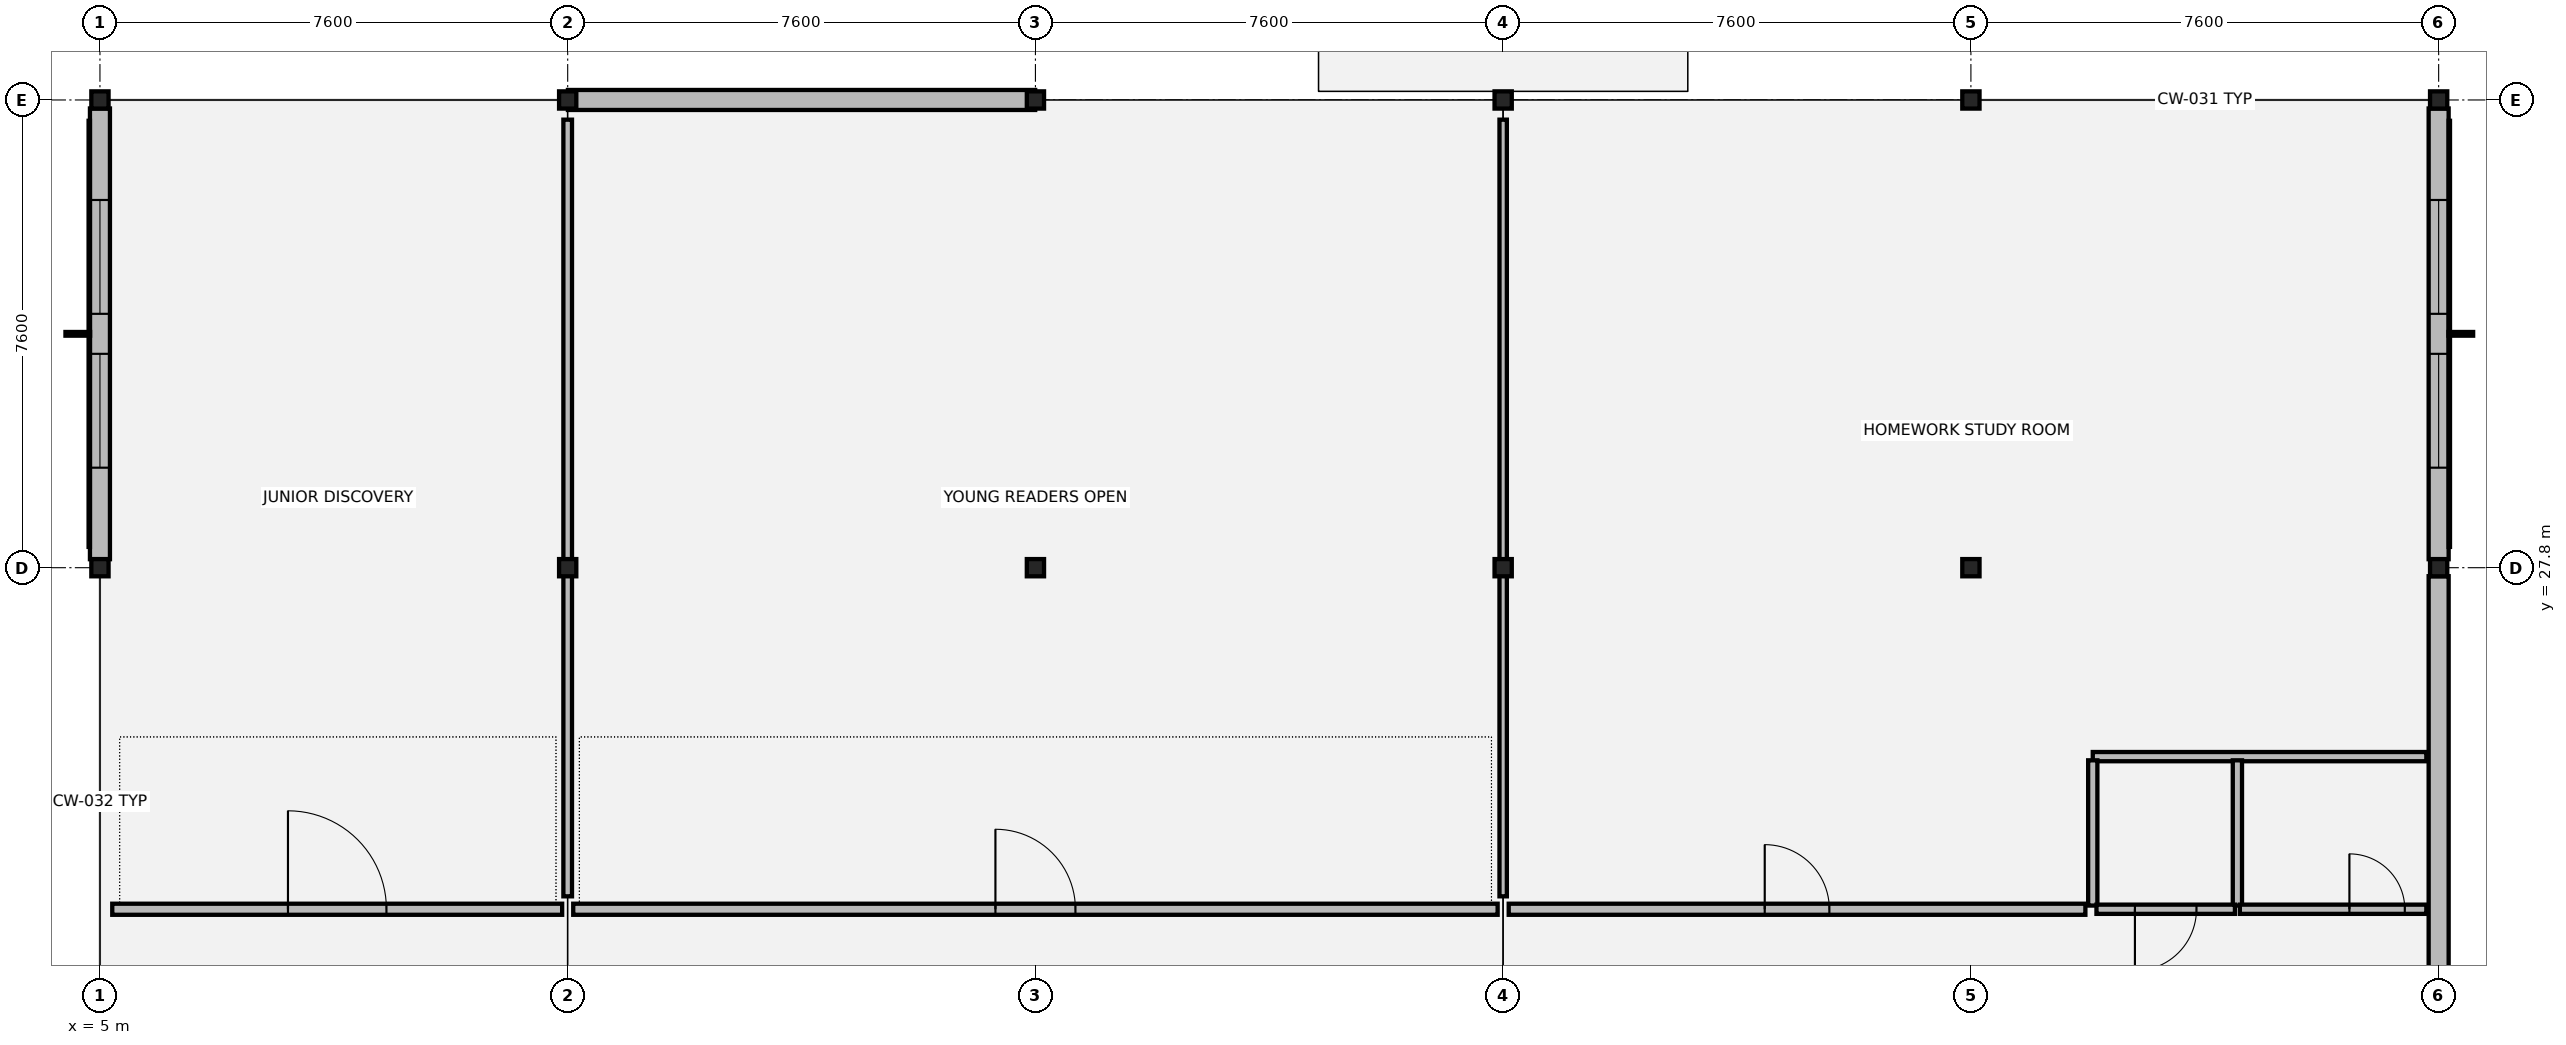
"""IFC4 building model, lengths in metres.
Left out: names, types, materials, properties, quantities, classifications, styles, units other than length and angle.
Written with IfcOpenShell. Run it as: python <this file> out.ifc"""

import sys

from ifc_helpers import new_model, si_unit, direction, frame, frame_2d, origin, origin_2d, place, context, subcontext, project, spatial, rectangle, i_section, extrude, element, fill, save


model = new_model("IFC4")
c1 = context("Model", 3, precision=1e-05, world=origin(), true_north=direction((0.0, 1.0)))
c2 = subcontext(c1, "Body", "Model", "MODEL_VIEW")
j1 = project(units=[si_unit("LENGTHUNIT", "METRE"), si_unit("PLANEANGLEUNIT", "RADIAN")], contexts=[c1])
p1 = place(None, origin())
s1 = spatial("IfcSite", under=j1, at=p1, CompositionType="ELEMENT")
p2 = place(p1, origin())
s2 = spatial("IfcBuilding", under=s1, at=p2, CompositionType="ELEMENT")
p3 = place(p2, frame((0.0, 0.0, 5.1)))
s3 = spatial("IfcBuildingStorey", under=s2, at=p3, CompositionType="ELEMENT", Elevation=5.1)
for number, where, z_axis, x_axis in (
    (1, (5.0, 27.8, 0.0), (0.0, 0.0, 1.0), (1.0, 0.0, 0.0)),
    (2, (5.0, 35.4, 0.0), (0.0, 0.0, 1.0), (1.0, 0.0, 0.0)),
    (3, (12.6, 27.8, 0.0), (0.0, 0.0, 1.0), (1.0, 0.0, 0.0)),
    (4, (12.6, 35.4, 0.0), (0.0, 0.0, 1.0), (1.0, 0.0, 0.0)),
    (5, (20.2, 27.8, 0.0), (0.0, 0.0, 1.0), (1.0, 0.0, 0.0)),
    (6, (20.2, 35.4, 0.0), (0.0, 0.0, 1.0), (1.0, 0.0, 0.0)),
    (7, (27.8, 27.8, 0.0), (0.0, 0.0, 1.0), (1.0, 0.0, 0.0)),
    (8, (27.8, 35.4, 0.0), (0.0, 0.0, 1.0), (1.0, 0.0, 0.0)),
    (9, (35.4, 27.8, 0.0), (0.0, 0.0, 1.0), (1.0, 0.0, 0.0)),
    (10, (35.4, 35.4, 0.0), (0.0, 0.0, 1.0), (1.0, 0.0, 0.0)),
    (11, (43.0, 27.8, 0.0), (0.0, 0.0, 1.0), (1.0, 0.0, 0.0)),
    (12, (43.0, 35.4, 0.0), (0.0, 0.0, 1.0), (1.0, 0.0, 0.0)),
):
    element("IfcColumn", number, at=place(p3, frame(where, z_axis=z_axis, x_axis=x_axis)), inside=s3, PredefinedType="COLUMN", context=c2, shape_type="SweptSolid", body=[
        extrude(i_section(OverallWidth=0.28, OverallDepth=0.28, WebThickness=0.01, FlangeThickness=0.018, at=origin_2d()), origin(), (0.0, 0.0, 1.0), 4.055),
    ])
p4 = place(p3, frame((43.0, 20.338, 0.0), z_axis=(0.0, 0.0, 1.0), x_axis=(0.0, 1.0, 0.0)))
e13 = element("IfcWall", 13, at=p4, inside=s3, PredefinedType="SOLIDWALL", context=c2, shape_type="SweptSolid", body=[
    extrude(rectangle(XDim=7.324, YDim=0.325, at=frame_2d((3.662, 0.0))), origin(), (0.0, 0.0, 1.0), 3.48),
])
p5 = place(p3, frame((43.0, 27.938, 0.0), z_axis=(0.0, 0.0, 1.0), x_axis=(0.0, 1.0, 0.0)))
e14 = element("IfcWall", 14, at=p5, inside=s3, PredefinedType="SOLIDWALL", context=c2, shape_type="SweptSolid", body=[
    extrude(rectangle(XDim=7.324, YDim=0.325, at=frame_2d((3.662, 0.0))), origin(), (0.0, 0.0, 1.0), 3.48),
])
p6 = place(p5, frame((1.487, 0.0, 0.8)))
e15 = element("IfcOpeningElement", 15, at=p6, cuts=e14, PredefinedType="OPENING", context=c2, shape_type="SweptSolid", body=[
    extrude(rectangle(XDim=1.85, YDim=2.1, at=frame_2d((0.925, 1.05))), frame((0.0, 0.172, 0.0), z_axis=(0.0, -1.0, 0.0), x_axis=(1.0, 0.0, 0.0)), (0.0, 0.0, 1.0), 0.345),
])
p7 = place(p5, frame((3.987, 0.0, 0.8)))
e16 = element("IfcOpeningElement", 16, at=p7, cuts=e14, PredefinedType="OPENING", context=c2, shape_type="SweptSolid", body=[
    extrude(rectangle(XDim=1.85, YDim=2.1, at=frame_2d((0.925, 1.05))), frame((0.0, 0.172, 0.0), z_axis=(0.0, -1.0, 0.0), x_axis=(1.0, 0.0, 0.0)), (0.0, 0.0, 1.0), 0.345),
])
p8 = place(p3, frame((20.196, 35.4, 0.0), z_axis=(0.0, 0.0, 1.0), x_axis=(-1.0, 0.0, 0.0)))
e17 = element("IfcWall", 17, at=p8, inside=s3, PredefinedType="SOLIDWALL", context=c2, shape_type="SweptSolid", body=[
    extrude(rectangle(XDim=7.592, YDim=0.325, at=frame_2d((3.796, 0.0))), origin(), (0.0, 0.0, 1.0), 3.48),
])
p9 = place(p3, frame((5.0, 35.262, 0.0), z_axis=(0.0, 0.0, 1.0), x_axis=(0.0, -1.0, 0.0)))
e18 = element("IfcWall", 18, at=p9, inside=s3, PredefinedType="SOLIDWALL", context=c2, shape_type="SweptSolid", body=[
    extrude(rectangle(XDim=7.324, YDim=0.325, at=frame_2d((3.662, 0.0))), origin(), (0.0, 0.0, 1.0), 3.48),
])
p10 = place(p9, frame((1.487, 0.0, 0.8)))
e19 = element("IfcOpeningElement", 19, at=p10, cuts=e18, PredefinedType="OPENING", context=c2, shape_type="SweptSolid", body=[
    extrude(rectangle(XDim=1.85, YDim=2.1, at=frame_2d((0.925, 1.05))), frame((0.0, 0.172, 0.0), z_axis=(0.0, -1.0, 0.0), x_axis=(1.0, 0.0, 0.0)), (0.0, 0.0, 1.0), 0.345),
])
p11 = place(p9, frame((3.987, 0.0, 0.8)))
e20 = element("IfcOpeningElement", 20, at=p11, cuts=e18, PredefinedType="OPENING", context=c2, shape_type="SweptSolid", body=[
    extrude(rectangle(XDim=1.85, YDim=2.1, at=frame_2d((0.925, 1.05))), frame((0.0, 0.172, 0.0), z_axis=(0.0, -1.0, 0.0), x_axis=(1.0, 0.0, 0.0)), (0.0, 0.0, 1.0), 0.345),
])
p12 = place(p3, frame((37.38, 24.73, 0.0), z_axis=(0.0, 0.0, 1.0), x_axis=(1.0, 0.0, 0.0)))
e21 = element("IfcWall", 21, at=p12, inside=s3, PredefinedType="PARTITIONING", context=c2, shape_type="SweptSolid", body=[
    extrude(rectangle(XDim=5.42, YDim=0.15, at=frame_2d((2.71, 0.0))), origin(), (0.0, 0.0, 1.0), 3.18),
])
for number, where, z_axis, x_axis in (
    (22, (37.38, 22.31, 0.0), (0.0, 0.0, 1.0), (0.0, 1.0, 0.0)),
    (23, (39.73, 22.31, 0.0), (0.0, 0.0, 1.0), (0.0, 1.0, 0.0)),
):
    element("IfcWall", number, at=place(p3, frame(where, z_axis=z_axis, x_axis=x_axis)), inside=s3, PredefinedType="PARTITIONING", context=c2, shape_type="SweptSolid", body=[
        extrude(rectangle(XDim=2.36, YDim=0.15, at=frame_2d((1.18, 0.0))), origin(), (0.0, 0.0, 1.0), 3.18),
    ])
p13 = place(p3, frame((37.44, 22.25, 0.0), z_axis=(0.0, 0.0, 1.0), x_axis=(1.0, 0.0, 0.0)))
e24 = element("IfcWall", 24, at=p13, inside=s3, PredefinedType="PARTITIONING", context=c2, shape_type="SweptSolid", body=[
    extrude(rectangle(XDim=2.25, YDim=0.15, at=frame_2d((1.125, 0.0))), origin(), (0.0, 0.0, 1.0), 3.18),
])
p14 = place(p13, frame((0.625, 0.0, 0.0)))
e25 = element("IfcOpeningElement", 25, at=p14, cuts=e24, PredefinedType="OPENING", context=c2, shape_type="SweptSolid", body=[
    extrude(rectangle(XDim=1.0, YDim=2.15, at=frame_2d((0.5, 1.075))), frame((0.0, 0.085, 0.0), z_axis=(0.0, -1.0, 0.0), x_axis=(1.0, 0.0, 0.0)), (0.0, 0.0, 1.0), 0.17),
])
p15 = place(p3, frame((39.77, 22.25, 0.0), z_axis=(0.0, 0.0, 1.0), x_axis=(1.0, 0.0, 0.0)))
e26 = element("IfcWall", 26, at=p15, inside=s3, PredefinedType="PARTITIONING", context=c2, shape_type="SweptSolid", body=[
    extrude(rectangle(XDim=3.03, YDim=0.15, at=frame_2d((1.515, 0.0))), origin(), (0.0, 0.0, 1.0), 3.18),
])
p16 = place(p15, frame((1.78, 0.0, 0.0)))
e27 = element("IfcOpeningElement", 27, at=p16, cuts=e26, PredefinedType="OPENING", context=c2, shape_type="SweptSolid", body=[
    extrude(rectangle(XDim=0.9, YDim=2.15, at=frame_2d((0.45, 1.075))), frame((0.0, 0.085, 0.0), z_axis=(0.0, -1.0, 0.0), x_axis=(1.0, 0.0, 0.0)), (0.0, 0.0, 1.0), 0.17),
])
p17 = place(p3, frame((5.2, 22.25, 0.0), z_axis=(0.0, 0.0, 1.0), x_axis=(1.0, 0.0, 0.0)))
e28 = element("IfcWall", 28, at=p17, inside=s3, PredefinedType="PARTITIONING", context=c2, shape_type="SweptSolid", body=[
    extrude(rectangle(XDim=7.31, YDim=0.18, at=frame_2d((3.655, 0.0))), origin(), (0.0, 0.0, 1.0), 3.18),
])
p18 = place(p17, frame((2.855, 0.0, 0.0)))
e29 = element("IfcOpeningElement", 29, at=p18, cuts=e28, PredefinedType="OPENING", context=c2, shape_type="SweptSolid", body=[
    extrude(rectangle(XDim=1.6, YDim=2.25, at=frame_2d((0.8, 1.125))), frame((0.0, 0.1, 0.0), z_axis=(0.0, -1.0, 0.0), x_axis=(1.0, 0.0, 0.0)), (0.0, 0.0, 1.0), 0.2),
])
p19 = place(p3, frame((12.69, 22.25, 0.0), z_axis=(0.0, 0.0, 1.0), x_axis=(1.0, 0.0, 0.0)))
e30 = element("IfcWall", 30, at=p19, inside=s3, PredefinedType="PARTITIONING", context=c2, shape_type="SweptSolid", body=[
    extrude(rectangle(XDim=15.02, YDim=0.18, at=frame_2d((7.51, 0.0))), origin(), (0.0, 0.0, 1.0), 3.18),
])
p20 = place(p19, frame((6.86, 0.0, 0.0)))
e31 = element("IfcOpeningElement", 31, at=p20, cuts=e30, PredefinedType="OPENING", context=c2, shape_type="SweptSolid", body=[
    extrude(rectangle(XDim=1.3, YDim=2.2, at=frame_2d((0.65, 1.1))), frame((0.0, 0.1, 0.0), z_axis=(0.0, -1.0, 0.0), x_axis=(1.0, 0.0, 0.0)), (0.0, 0.0, 1.0), 0.2),
])
p21 = place(p3, frame((27.89, 22.25, 0.0), z_axis=(0.0, 0.0, 1.0), x_axis=(1.0, 0.0, 0.0)))
e32 = element("IfcWall", 32, at=p21, inside=s3, PredefinedType="PARTITIONING", context=c2, shape_type="SweptSolid", body=[
    extrude(rectangle(XDim=9.37, YDim=0.18, at=frame_2d((4.685, 0.0))), origin(), (0.0, 0.0, 1.0), 3.18),
])
p22 = place(p21, frame((4.16, 0.0, 0.0)))
e33 = element("IfcOpeningElement", 33, at=p22, cuts=e32, PredefinedType="OPENING", context=c2, shape_type="SweptSolid", body=[
    extrude(rectangle(XDim=1.05, YDim=2.15, at=frame_2d((0.525, 1.075))), frame((0.0, 0.1, 0.0), z_axis=(0.0, -1.0, 0.0), x_axis=(1.0, 0.0, 0.0)), (0.0, 0.0, 1.0), 0.2),
])
p23 = place(p3, frame((12.6, 22.46, 0.0), z_axis=(0.0, 0.0, 1.0), x_axis=(0.0, 1.0, 0.0)))
e34 = element("IfcWall", 34, at=p23, inside=s3, PredefinedType="PARTITIONING", context=c2, shape_type="SweptSolid", body=[
    extrude(rectangle(XDim=12.62, YDim=0.14, at=frame_2d((6.31, 0.0))), origin(), (0.0, 0.0, 1.0), 3.18),
])
p24 = place(p3, frame((27.8, 22.46, 0.0), z_axis=(0.0, 0.0, 1.0), x_axis=(0.0, 1.0, 0.0)))
e35 = element("IfcWall", 35, at=p24, inside=s3, PredefinedType="PARTITIONING", context=c2, shape_type="SweptSolid", body=[
    extrude(rectangle(XDim=12.62, YDim=0.12, at=frame_2d((6.31, 0.0))), origin(), (0.0, 0.0, 1.0), 3.18),
])
p25 = place(p6, origin())
e36 = element("IfcWindow", 36, at=p25, inside=s3, PartitioningType="SINGLE_PANEL", PredefinedType="WINDOW", context=c2, shape_type="SweptSolid", body=[
    extrude(rectangle(XDim=1.85, YDim=2.1, at=frame_2d((0.925, 1.05))), frame((0.0, 0.03, 0.0), z_axis=(0.0, -1.0, 0.0), x_axis=(1.0, 0.0, 0.0)), (0.0, 0.0, 1.0), 0.06),
])
fill(e15, e36)
p26 = place(p7, origin())
e37 = element("IfcWindow", 37, at=p26, inside=s3, PartitioningType="SINGLE_PANEL", PredefinedType="WINDOW", context=c2, shape_type="SweptSolid", body=[
    extrude(rectangle(XDim=1.85, YDim=2.1, at=frame_2d((0.925, 1.05))), frame((0.0, 0.03, 0.0), z_axis=(0.0, -1.0, 0.0), x_axis=(1.0, 0.0, 0.0)), (0.0, 0.0, 1.0), 0.06),
])
fill(e16, e37)
p27 = place(p10, origin())
e38 = element("IfcWindow", 38, at=p27, inside=s3, PartitioningType="SINGLE_PANEL", PredefinedType="WINDOW", context=c2, shape_type="SweptSolid", body=[
    extrude(rectangle(XDim=1.85, YDim=2.1, at=frame_2d((0.925, 1.05))), frame((0.0, 0.03, 0.0), z_axis=(0.0, -1.0, 0.0), x_axis=(1.0, 0.0, 0.0)), (0.0, 0.0, 1.0), 0.06),
])
fill(e19, e38)
p28 = place(p11, origin())
e39 = element("IfcWindow", 39, at=p28, inside=s3, PartitioningType="SINGLE_PANEL", PredefinedType="WINDOW", context=c2, shape_type="SweptSolid", body=[
    extrude(rectangle(XDim=1.85, YDim=2.1, at=frame_2d((0.925, 1.05))), frame((0.0, 0.03, 0.0), z_axis=(0.0, -1.0, 0.0), x_axis=(1.0, 0.0, 0.0)), (0.0, 0.0, 1.0), 0.06),
])
fill(e20, e39)
p29 = place(p14, origin())
e40 = element("IfcDoor", 40, at=p29, inside=s3, OperationType="SINGLE_SWING_RIGHT", PredefinedType="DOOR", context=c2, shape_type="SweptSolid", body=[
    extrude(rectangle(XDim=1.0, YDim=2.15, at=frame_2d((0.5, 1.075))), frame((0.0, 0.025, 0.0), z_axis=(0.0, -1.0, 0.0), x_axis=(1.0, 0.0, 0.0)), (0.0, 0.0, 1.0), 0.05),
])
fill(e25, e40)
p30 = place(p16, origin())
e41 = element("IfcDoor", 41, at=p30, inside=s3, OperationType="SINGLE_SWING_LEFT", PredefinedType="DOOR", context=c2, shape_type="SweptSolid", body=[
    extrude(rectangle(XDim=0.9, YDim=2.15, at=frame_2d((0.45, 1.075))), frame((0.0, 0.025, 0.0), z_axis=(0.0, -1.0, 0.0), x_axis=(1.0, 0.0, 0.0)), (0.0, 0.0, 1.0), 0.05),
])
fill(e27, e41)
p31 = place(p18, origin())
e42 = element("IfcDoor", 42, at=p31, inside=s3, OperationType="DOUBLE_DOOR_SINGLE_SWING", PredefinedType="DOOR", context=c2, shape_type="SweptSolid", body=[
    extrude(rectangle(XDim=1.6, YDim=2.25, at=frame_2d((0.8, 1.125))), frame((0.0, 0.025, 0.0), z_axis=(0.0, -1.0, 0.0), x_axis=(1.0, 0.0, 0.0)), (0.0, 0.0, 1.0), 0.05),
])
fill(e29, e42)
p32 = place(p20, origin())
e43 = element("IfcDoor", 43, at=p32, inside=s3, OperationType="SINGLE_SWING_LEFT", PredefinedType="DOOR", context=c2, shape_type="SweptSolid", body=[
    extrude(rectangle(XDim=1.3, YDim=2.2, at=frame_2d((0.65, 1.1))), frame((0.0, 0.025, 0.0), z_axis=(0.0, -1.0, 0.0), x_axis=(1.0, 0.0, 0.0)), (0.0, 0.0, 1.0), 0.05),
])
fill(e31, e43)
p33 = place(p22, origin())
e44 = element("IfcDoor", 44, at=p33, inside=s3, OperationType="SINGLE_SWING_LEFT", PredefinedType="DOOR", context=c2, shape_type="SweptSolid", body=[
    extrude(rectangle(XDim=1.05, YDim=2.15, at=frame_2d((0.525, 1.075))), frame((0.0, 0.025, 0.0), z_axis=(0.0, -1.0, 0.0), x_axis=(1.0, 0.0, 0.0)), (0.0, 0.0, 1.0), 0.05),
])
fill(e33, e44)
save(model, sys.argv[1])
